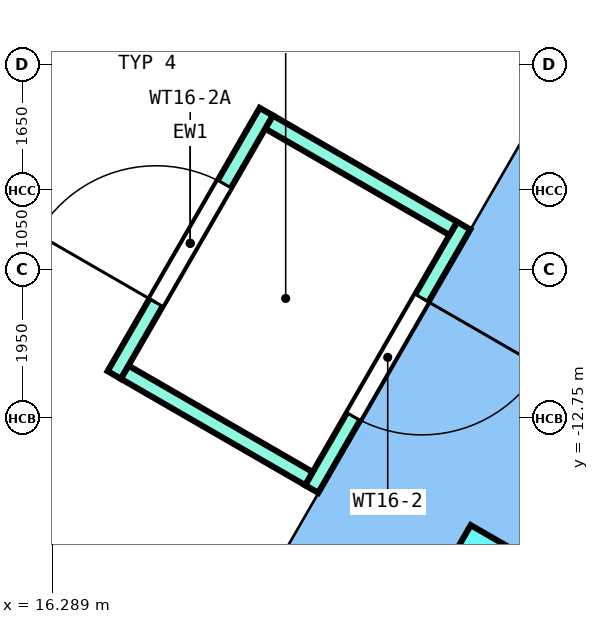
"""IFC4 building model, lengths in metres.
Left out: names, types, materials, properties, quantities, classifications, styles, units other than length and angle.
Written with IfcOpenShell. Run it as: python <this file> out.ifc"""

import sys

from ifc_helpers import new_model, si_unit, direction, frame, frame_2d, origin, origin_2d, place, context, subcontext, project, spatial, rectangle, extrude, element, fill, save


model = new_model("IFC4")
c1 = context("Model", 3, precision=1e-05, world=origin(), true_north=direction((0.0, 1.0)))
c2 = subcontext(c1, "Body", "Model", "MODEL_VIEW")
j1 = project(units=[si_unit("LENGTHUNIT", "METRE"), si_unit("PLANEANGLEUNIT", "RADIAN")], contexts=[c1])
p1 = place(None, origin())
s1 = spatial("IfcSite", under=j1, at=p1, CompositionType="ELEMENT")
p2 = place(p1, origin())
s2 = spatial("IfcBuilding", under=s1, at=p2, CompositionType="ELEMENT")
p3 = place(p2, frame((0.0, 0.0, 71.8)))
s3 = spatial("IfcBuildingStorey", under=s2, at=p3, CompositionType="ELEMENT", Elevation=71.8)
p4 = place(p3, frame((22.065, -15.183, 0.0), z_axis=(0.0, 0.0, 1.0), x_axis=(0.5, 0.866025403784, 0.0)))
e1 = element("IfcColumn", 1, at=p4, inside=s3, PredefinedType="COLUMN", context=c2, shape_type="SweptSolid", body=[
    extrude(rectangle(XDim=1.5, YDim=1.5, at=origin_2d()), origin(), (0.0, 0.0, 1.0), 8.65),
])
p5 = place(p3, frame((19.698, -13.682, 0.0), z_axis=(0.0, 0.0, 1.0), x_axis=(0.49999894854, 0.866026010844, 0.0)))
e2 = element("IfcWall", 2, at=p5, inside=s3, PredefinedType="SOLIDWALL", context=c2, shape_type="SweptSolid", body=[
    extrude(rectangle(XDim=4.0, YDim=0.2, at=frame_2d((2.0, 0.0))), origin(), (0.0, 0.0, 1.0), 7.65),
])
p6 = place(p5, frame((1.1, 0.0, 0.0)))
e3 = element("IfcOpeningElement", 3, at=p6, cuts=e2, PredefinedType="OPENING", context=c2, shape_type="SweptSolid", body=[
    extrude(rectangle(XDim=1.8, YDim=2.4, at=frame_2d((0.9, 1.2))), frame((0.0, 0.11, 0.0), z_axis=(0.0, -1.0, 0.0), x_axis=(1.0, 0.0, 0.0)), (0.0, 0.0, 1.0), 0.22),
])
p7 = place(p3, frame((19.661, -13.545, 0.0), z_axis=(0.0, 0.0, 1.0), x_axis=(-0.866034573852, 0.49998411664, 0.0)))
e4 = element("IfcWall", 4, at=p7, inside=s3, PredefinedType="SOLIDWALL", context=c2, shape_type="SweptSolid", body=[
    extrude(rectangle(XDim=2.8, YDim=0.2, at=frame_2d((1.4, 0.0))), origin(), (0.0, 0.0, 1.0), 7.65),
])
p8 = place(p3, frame((21.561, -10.255, 0.0), z_axis=(0.0, 0.0, 1.0), x_axis=(-0.865996816683, 0.500049511043, 0.0)))
e5 = element("IfcWall", 5, at=p8, inside=s3, PredefinedType="SOLIDWALL", context=c2, shape_type="SweptSolid", body=[
    extrude(rectangle(XDim=2.8, YDim=0.2, at=frame_2d((1.4, 0.0))), origin(), (0.0, 0.0, 1.0), 7.65),
])
p9 = place(p3, frame((17.1, -12.182, 0.0), z_axis=(0.0, 0.0, 1.0), x_axis=(0.49999894854, 0.866026010844, 0.0)))
e6 = element("IfcWall", 6, at=p9, inside=s3, PredefinedType="SOLIDWALL", context=c2, shape_type="SweptSolid", body=[
    extrude(rectangle(XDim=4.0, YDim=0.2, at=frame_2d((2.0, 0.0))), origin(), (0.0, 0.0, 1.0), 7.65),
])
p10 = place(p9, frame((1.1, 0.0, 0.0)))
e7 = element("IfcOpeningElement", 7, at=p10, cuts=e6, PredefinedType="OPENING", context=c2, shape_type="SweptSolid", body=[
    extrude(rectangle(XDim=1.8, YDim=2.4, at=frame_2d((0.9, 1.2))), frame((0.0, 0.11, 0.0), z_axis=(0.0, -1.0, 0.0), x_axis=(1.0, 0.0, 0.0)), (0.0, 0.0, 1.0), 0.22),
])
p11 = place(p6, origin())
e8 = element("IfcDoor", 8, at=p11, inside=s3, OperationType="DOUBLE_DOOR_SINGLE_SWING", PredefinedType="DOOR", context=c2, shape_type="SweptSolid", body=[
    extrude(rectangle(XDim=1.8, YDim=2.4, at=frame_2d((0.9, 1.2))), frame((0.0, 0.025, 0.0), z_axis=(0.0, -1.0, 0.0), x_axis=(1.0, 0.0, 0.0)), (0.0, 0.0, 1.0), 0.05),
])
fill(e3, e8)
p12 = place(p10, origin())
e9 = element("IfcDoor", 9, at=p12, inside=s3, OperationType="DOUBLE_DOOR_SINGLE_SWING", PredefinedType="DOOR", context=c2, shape_type="SweptSolid", body=[
    extrude(rectangle(XDim=1.8, YDim=2.4, at=frame_2d((0.9, 1.2))), frame((0.0, 0.025, 0.0), z_axis=(0.0, -1.0, 0.0), x_axis=(1.0, 0.0, 0.0)), (0.0, 0.0, 1.0), 0.05),
])
fill(e7, e9)
save(model, sys.argv[1])
